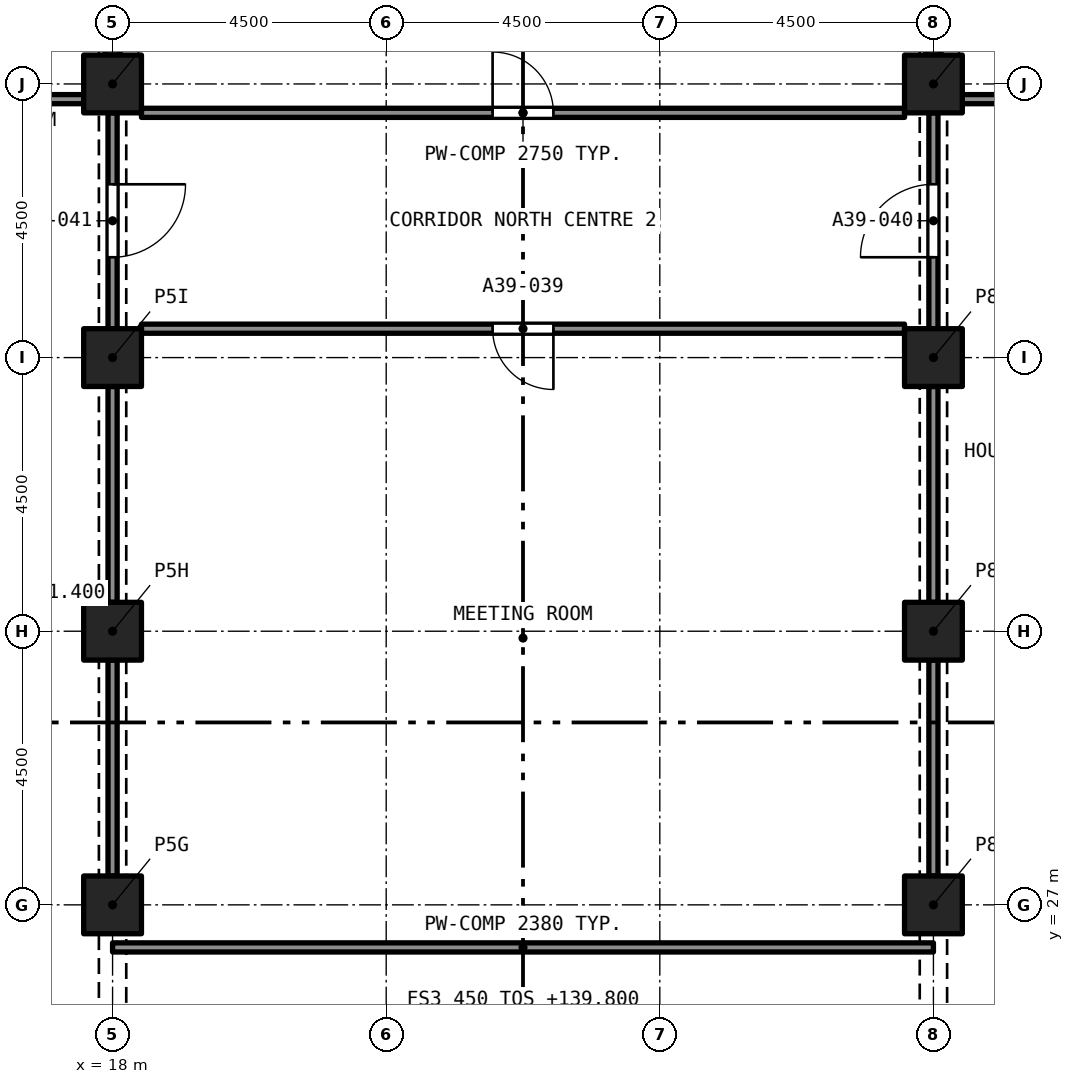
"""IFC4 building model, lengths in metres.
Left out: names, types, materials, properties, quantities, classifications, styles, units other than length and angle.
Written with IfcOpenShell. Run it as: python <this file> out.ifc"""

import sys

from ifc_helpers import new_model, si_unit, direction, frame, frame_2d, origin, origin_2d, place, context, subcontext, project, spatial, rectangle, extrude, element, fill, save


model = new_model("IFC4")
c1 = context("Model", 3, precision=1e-05, world=origin(), true_north=direction((0.0, 1.0)))
c2 = subcontext(c1, "Body", "Model", "MODEL_VIEW")
j1 = project(units=[si_unit("LENGTHUNIT", "METRE"), si_unit("PLANEANGLEUNIT", "RADIAN")], contexts=[c1])
p1 = place(None, origin())
s1 = spatial("IfcSite", under=j1, at=p1, CompositionType="ELEMENT")
p2 = place(p1, origin())
s2 = spatial("IfcBuilding", under=s1, at=p2, CompositionType="ELEMENT")
p3 = place(p2, frame((0.0, 0.0, 139.8)))
s3 = spatial("IfcBuildingStorey", under=s2, at=p3, CompositionType="ELEMENT", Elevation=139.8)
for number, where, z_axis, x_axis in (
    (1, (18.0, 27.0, 0.0), (0.0, 0.0, 1.0), (1.0, 0.0, 0.0)),
    (2, (31.5, 27.0, 0.0), (0.0, 0.0, 1.0), (1.0, 0.0, 0.0)),
    (3, (18.0, 31.5, 0.0), (0.0, 0.0, 1.0), (1.0, 0.0, 0.0)),
    (4, (31.5, 31.5, 0.0), (0.0, 0.0, 1.0), (1.0, 0.0, 0.0)),
    (5, (18.0, 36.0, 0.0), (0.0, 0.0, 1.0), (1.0, 0.0, 0.0)),
    (6, (31.5, 36.0, 0.0), (0.0, 0.0, 1.0), (1.0, 0.0, 0.0)),
    (7, (18.0, 40.5, 0.0), (0.0, 0.0, 1.0), (1.0, 0.0, 0.0)),
    (8, (31.5, 40.5, 0.0), (0.0, 0.0, 1.0), (1.0, 0.0, 0.0)),
):
    element("IfcColumn", number, at=place(p3, frame(where, z_axis=z_axis, x_axis=x_axis)), inside=s3, PredefinedType="COLUMN", context=c2, shape_type="SweptSolid", body=[
        extrude(rectangle(XDim=0.95, YDim=0.95, at=origin_2d()), origin(), (0.0, 0.0, 1.0), 3.2),
    ])
p4 = place(p3, frame((18.0, 40.975, 0.0), z_axis=(0.0, 0.0, 1.0), x_axis=(0.0, 1.0, 0.0)))
e9 = element("IfcWall", 9, at=p4, inside=s3, PredefinedType="PARTITIONING", context=c2, shape_type="SweptSolid", body=[
    extrude(rectangle(XDim=3.55, YDim=0.25, at=frame_2d((1.775, 0.0))), origin(), (0.0, 0.0, 1.0), 2.38),
])
p5 = place(p3, frame((13.25, 40.25, 0.0), z_axis=(0.0, 0.0, 1.0), x_axis=(1.0, 0.0, 0.0)))
e10 = element("IfcWall", 10, at=p5, inside=s3, PredefinedType="PARTITIONING", context=c2, shape_type="SweptSolid", body=[
    extrude(rectangle(XDim=4.275, YDim=0.15, at=frame_2d((2.137, 0.0))), origin(), (0.0, 0.0, 1.0), 2.9),
])
p6 = place(p3, frame((31.5, 40.975, 0.0), z_axis=(0.0, 0.0, 1.0), x_axis=(0.0, 1.0, 0.0)))
e11 = element("IfcWall", 11, at=p6, inside=s3, PredefinedType="PARTITIONING", context=c2, shape_type="SweptSolid", body=[
    extrude(rectangle(XDim=3.46, YDim=0.25, at=frame_2d((1.73, 0.0))), origin(), (0.0, 0.0, 1.0), 2.38),
])
p7 = place(p3, frame((31.975, 40.25, 0.0), z_axis=(0.0, 0.0, 1.0), x_axis=(1.0, 0.0, 0.0)))
e12 = element("IfcWall", 12, at=p7, inside=s3, PredefinedType="PARTITIONING", context=c2, shape_type="SweptSolid", body=[
    extrude(rectangle(XDim=2.375, YDim=0.15, at=frame_2d((1.188, 0.0))), origin(), (0.0, 0.0, 1.0), 2.9),
])
p8 = place(p7, frame((1.245, 0.0, 0.0)))
e13 = element("IfcOpeningElement", 13, at=p8, cuts=e12, PredefinedType="OPENING", context=c2, shape_type="SweptSolid", body=[
    extrude(rectangle(XDim=1.0, YDim=2.1, at=frame_2d((0.5, 1.05))), frame((0.0, 0.085, 0.0), z_axis=(0.0, -1.0, 0.0), x_axis=(1.0, 0.0, 0.0)), (0.0, 0.0, 1.0), 0.17),
])
p9 = place(p3, frame((18.475, 40.025, 0.0), z_axis=(0.0, 0.0, 1.0), x_axis=(1.0, 0.0, 0.0)))
e14 = element("IfcWall", 14, at=p9, inside=s3, PredefinedType="PARTITIONING", context=c2, shape_type="SweptSolid", body=[
    extrude(rectangle(XDim=12.55, YDim=0.15, at=frame_2d((6.275, 0.0))), origin(), (0.0, 0.0, 1.0), 2.75),
])
p10 = place(p9, frame((5.775, 0.0, 0.0)))
e15 = element("IfcOpeningElement", 15, at=p10, cuts=e14, PredefinedType="OPENING", context=c2, shape_type="SweptSolid", body=[
    extrude(rectangle(XDim=1.0, YDim=2.1, at=frame_2d((0.5, 1.05))), frame((0.0, 0.085, 0.0), z_axis=(0.0, -1.0, 0.0), x_axis=(1.0, 0.0, 0.0)), (0.0, 0.0, 1.0), 0.17),
])
p11 = place(p3, frame((31.025, 36.475, 0.0), z_axis=(0.0, 0.0, 1.0), x_axis=(-1.0, 0.0, 0.0)))
e16 = element("IfcWall", 16, at=p11, inside=s3, PredefinedType="PARTITIONING", context=c2, shape_type="SweptSolid", body=[
    extrude(rectangle(XDim=12.55, YDim=0.15, at=frame_2d((6.275, 0.0))), origin(), (0.0, 0.0, 1.0), 2.75),
])
p12 = place(p11, frame((5.775, 0.0, 0.0)))
e17 = element("IfcOpeningElement", 17, at=p12, cuts=e16, PredefinedType="OPENING", context=c2, shape_type="SweptSolid", body=[
    extrude(rectangle(XDim=1.0, YDim=2.1, at=frame_2d((0.5, 1.05))), frame((0.0, 0.085, 0.0), z_axis=(0.0, -1.0, 0.0), x_axis=(1.0, 0.0, 0.0)), (0.0, 0.0, 1.0), 0.17),
])
p13 = place(p3, frame((31.5, 36.475, 0.0), z_axis=(0.0, 0.0, 1.0), x_axis=(0.0, 1.0, 0.0)))
e18 = element("IfcWall", 18, at=p13, inside=s3, PredefinedType="PARTITIONING", context=c2, shape_type="SweptSolid", body=[
    extrude(rectangle(XDim=3.55, YDim=0.15, at=frame_2d((1.775, 0.0))), origin(), (0.0, 0.0, 1.0), 2.38),
])
p14 = place(p13, frame((1.175, 0.0, 0.0)))
e19 = element("IfcOpeningElement", 19, at=p14, cuts=e18, PredefinedType="OPENING", context=c2, shape_type="SweptSolid", body=[
    extrude(rectangle(XDim=1.2, YDim=2.1, at=frame_2d((0.6, 1.05))), frame((0.0, 0.085, 0.0), z_axis=(0.0, -1.0, 0.0), x_axis=(1.0, 0.0, 0.0)), (0.0, 0.0, 1.0), 0.17),
])
p15 = place(p3, frame((18.0, 40.025, 0.0), z_axis=(0.0, 0.0, 1.0), x_axis=(0.0, -1.0, 0.0)))
e20 = element("IfcWall", 20, at=p15, inside=s3, PredefinedType="PARTITIONING", context=c2, shape_type="SweptSolid", body=[
    extrude(rectangle(XDim=3.55, YDim=0.15, at=frame_2d((1.775, 0.0))), origin(), (0.0, 0.0, 1.0), 2.38),
])
p16 = place(p15, frame((1.175, 0.0, 0.0)))
e21 = element("IfcOpeningElement", 21, at=p16, cuts=e20, PredefinedType="OPENING", context=c2, shape_type="SweptSolid", body=[
    extrude(rectangle(XDim=1.2, YDim=2.1, at=frame_2d((0.6, 1.05))), frame((0.0, 0.085, 0.0), z_axis=(0.0, -1.0, 0.0), x_axis=(1.0, 0.0, 0.0)), (0.0, 0.0, 1.0), 0.17),
])
for number, where, z_axis, x_axis in (
    (22, (31.5, 31.975, 0.0), (0.0, 0.0, 1.0), (0.0, 1.0, 0.0)),
    (23, (31.5, 27.475, 0.0), (0.0, 0.0, 1.0), (0.0, 1.0, 0.0)),
    (24, (18.0, 27.475, 0.0), (0.0, 0.0, 1.0), (0.0, 1.0, 0.0)),
    (25, (18.0, 31.975, 0.0), (0.0, 0.0, 1.0), (0.0, 1.0, 0.0)),
):
    element("IfcWall", number, at=place(p3, frame(where, z_axis=z_axis, x_axis=x_axis)), inside=s3, PredefinedType="PARTITIONING", context=c2, shape_type="SweptSolid", body=[
        extrude(rectangle(XDim=3.55, YDim=0.15, at=frame_2d((1.775, 0.0))), origin(), (0.0, 0.0, 1.0), 2.38),
    ])
p17 = place(p3, frame((18.0, 26.3, 0.0), z_axis=(0.0, 0.0, 1.0), x_axis=(1.0, 0.0, 0.0)))
e26 = element("IfcWall", 26, at=p17, inside=s3, PredefinedType="PARTITIONING", context=c2, shape_type="SweptSolid", body=[
    extrude(rectangle(XDim=13.5, YDim=0.15, at=frame_2d((6.75, 0.0))), origin(), (0.0, 0.0, 1.0), 2.38),
])
p18 = place(p10, origin())
e27 = element("IfcDoor", 27, at=p18, inside=s3, OperationType="SINGLE_SWING_RIGHT", PredefinedType="DOOR", context=c2, shape_type="SweptSolid", body=[
    extrude(rectangle(XDim=1.0, YDim=2.1, at=frame_2d((0.5, 1.05))), frame((0.0, 0.025, 0.0), z_axis=(0.0, -1.0, 0.0), x_axis=(1.0, 0.0, 0.0)), (0.0, 0.0, 1.0), 0.05),
])
fill(e15, e27)
p19 = place(p12, origin())
e28 = element("IfcDoor", 28, at=p19, inside=s3, OperationType="SINGLE_SWING_RIGHT", PredefinedType="DOOR", context=c2, shape_type="SweptSolid", body=[
    extrude(rectangle(XDim=1.0, YDim=2.1, at=frame_2d((0.5, 1.05))), frame((0.0, 0.025, 0.0), z_axis=(0.0, -1.0, 0.0), x_axis=(1.0, 0.0, 0.0)), (0.0, 0.0, 1.0), 0.05),
])
fill(e17, e28)
p20 = place(p14, origin())
e29 = element("IfcDoor", 29, at=p20, inside=s3, OperationType="SINGLE_SWING_LEFT", PredefinedType="DOOR", context=c2, shape_type="SweptSolid", body=[
    extrude(rectangle(XDim=1.2, YDim=2.1, at=frame_2d((0.6, 1.05))), frame((0.0, 0.025, 0.0), z_axis=(0.0, -1.0, 0.0), x_axis=(1.0, 0.0, 0.0)), (0.0, 0.0, 1.0), 0.05),
])
fill(e19, e29)
p21 = place(p16, origin())
e30 = element("IfcDoor", 30, at=p21, inside=s3, OperationType="SINGLE_SWING_LEFT", PredefinedType="DOOR", context=c2, shape_type="SweptSolid", body=[
    extrude(rectangle(XDim=1.2, YDim=2.1, at=frame_2d((0.6, 1.05))), frame((0.0, 0.025, 0.0), z_axis=(0.0, -1.0, 0.0), x_axis=(1.0, 0.0, 0.0)), (0.0, 0.0, 1.0), 0.05),
])
fill(e21, e30)
save(model, sys.argv[1])
